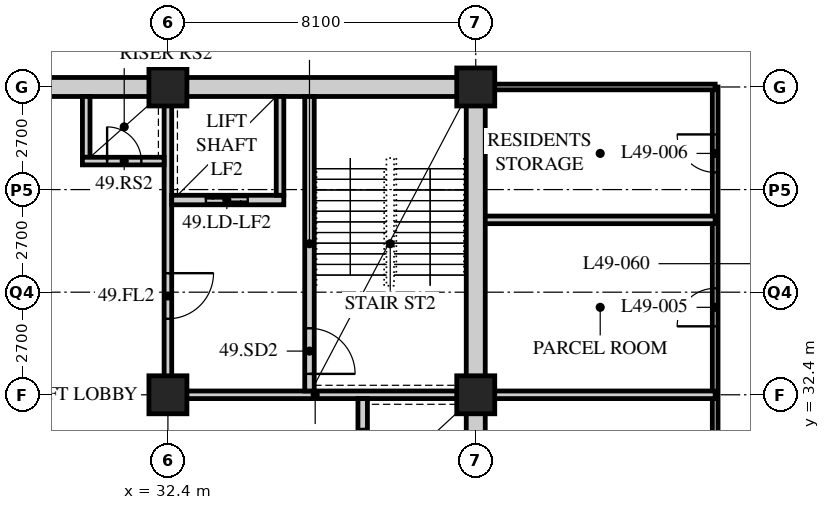
"""IFC4 building model, lengths in metres.
Left out: names, types, materials, properties, quantities, classifications, styles, units other than length and angle.
Written with IfcOpenShell. Run it as: python <this file> out.ifc"""

import sys

from ifc_helpers import new_model, si_unit, direction, frame, frame_2d, origin, origin_2d, place, context, subcontext, project, spatial, rectangle, hollow_rectangle, extrude, element, fill, save


model = new_model("IFC4")
c1 = context("Model", 3, precision=1e-05, world=origin(), true_north=direction((0.0, 1.0)))
c2 = subcontext(c1, "Body", "Model", "MODEL_VIEW")
j1 = project(units=[si_unit("LENGTHUNIT", "METRE"), si_unit("PLANEANGLEUNIT", "RADIAN")], contexts=[c1])
p1 = place(None, origin())
s1 = spatial("IfcSite", under=j1, at=p1, CompositionType="ELEMENT")
p2 = place(p1, origin())
s2 = spatial("IfcBuilding", under=s1, at=p2, CompositionType="ELEMENT")
p3 = place(p2, frame((0.0, 0.0, 192.0)))
s3 = spatial("IfcBuildingStorey", under=s2, at=p3, CompositionType="ELEMENT", Elevation=192.0)
for number, where, z_axis, x_axis in (
    (1, (32.4, 32.4, 0.0), (0.0, 0.0, 1.0), (1.0, 0.0, 0.0)),
    (2, (32.4, 40.5, 0.0), (0.0, 0.0, 1.0), (1.0, 0.0, 0.0)),
    (3, (40.5, 32.4, 0.0), (0.0, 0.0, 1.0), (1.0, 0.0, 0.0)),
    (4, (40.5, 40.5, 0.0), (0.0, 0.0, 1.0), (1.0, 0.0, 0.0)),
):
    element("IfcColumn", number, at=place(p3, frame(where, z_axis=z_axis, x_axis=x_axis)), inside=s3, PredefinedType="COLUMN", context=c2, shape_type="SweptSolid", body=[
        extrude(hollow_rectangle(XDim=1.0, YDim=1.0, WallThickness=0.1, at=origin_2d()), origin(), (0.0, 0.0, 1.0), 3.6),
    ])
p4 = place(p3, frame((46.8, 20.7, 0.0), z_axis=(0.0, 0.0, 1.0), x_axis=(0.0, 1.0, 0.0)))
e5 = element("IfcWall", 5, at=p4, inside=s3, PredefinedType="PARTITIONING", context=c2, shape_type="SweptSolid", body=[
    extrude(rectangle(XDim=19.8, YDim=0.15, at=frame_2d((9.9, 0.0))), origin(), (0.0, 0.0, 1.0), 3.39),
])
p5 = place(p4, frame((4.052, 0.0, 0.0)))
e6 = element("IfcOpeningElement", 6, at=p5, cuts=e5, PredefinedType="OPENING", context=c2, shape_type="SweptSolid", body=[
    extrude(rectangle(XDim=1.0, YDim=2.1, at=frame_2d((0.5, 1.05))), frame((0.0, 0.085, 0.0), z_axis=(0.0, -1.0, 0.0), x_axis=(1.0, 0.0, 0.0)), (0.0, 0.0, 1.0), 0.17),
])
p6 = place(p4, frame((8.102, 0.0, 0.0)))
e7 = element("IfcOpeningElement", 7, at=p6, cuts=e5, PredefinedType="OPENING", context=c2, shape_type="SweptSolid", body=[
    extrude(rectangle(XDim=1.0, YDim=2.1, at=frame_2d((0.5, 1.05))), frame((0.0, 0.085, 0.0), z_axis=(0.0, -1.0, 0.0), x_axis=(1.0, 0.0, 0.0)), (0.0, 0.0, 1.0), 0.17),
])
p7 = place(p4, frame((13.502, 0.0, 0.0)))
e8 = element("IfcOpeningElement", 8, at=p7, cuts=e5, PredefinedType="OPENING", context=c2, shape_type="SweptSolid", body=[
    extrude(rectangle(XDim=1.0, YDim=2.1, at=frame_2d((0.5, 1.05))), frame((0.0, 0.085, 0.0), z_axis=(0.0, -1.0, 0.0), x_axis=(1.0, 0.0, 0.0)), (0.0, 0.0, 1.0), 0.17),
])
p8 = place(p4, frame((17.552, 0.0, 0.0)))
e9 = element("IfcOpeningElement", 9, at=p8, cuts=e5, PredefinedType="OPENING", context=c2, shape_type="SweptSolid", body=[
    extrude(rectangle(XDim=1.0, YDim=2.1, at=frame_2d((0.5, 1.05))), frame((0.0, 0.085, 0.0), z_axis=(0.0, -1.0, 0.0), x_axis=(1.0, 0.0, 0.0)), (0.0, 0.0, 1.0), 0.17),
])
p9 = place(p3, frame((46.8, 40.5, 0.0), z_axis=(0.0, 0.0, 1.0), x_axis=(-1.0, 0.0, 0.0)))
e10 = element("IfcWall", 10, at=p9, inside=s3, PredefinedType="PARTITIONING", context=c2, shape_type="SweptSolid", body=[
    extrude(rectangle(XDim=6.1, YDim=0.15, at=frame_2d((3.05, 0.0))), origin(), (0.0, 0.0, 1.0), 3.39),
])
for number, where, z_axis, x_axis in (
    (11, (40.5, 32.4, 0.0), (0.0, 0.0, 1.0), (1.0, 0.0, 0.0)),
    (12, (46.8, 37.003, 0.0), (0.0, 0.0, 1.0), (-1.0, 0.0, 0.0)),
):
    element("IfcWall", number, at=place(p3, frame(where, z_axis=z_axis, x_axis=x_axis)), inside=s3, PredefinedType="SOLIDWALL", context=c2, shape_type="SweptSolid", body=[
        extrude(rectangle(XDim=6.3, YDim=0.2, at=frame_2d((3.15, 0.0))), origin(), (0.0, 0.0, 1.0), 3.39),
    ])
p10 = place(p3, frame((15.95, 40.5, 0.0), z_axis=(0.0, 0.0, 1.0), x_axis=(1.0, 0.0, 0.0)))
e13 = element("IfcWall", 13, at=p10, inside=s3, PredefinedType="SOLIDWALL", context=c2, shape_type="SweptSolid", body=[
    extrude(rectangle(XDim=24.8, YDim=0.5, at=frame_2d((12.4, 0.0))), origin(), (0.0, 0.0, 1.0), 2.74),
])
p11 = place(p10, frame((11.5, 0.0, 0.0)))
e14 = element("IfcOpeningElement", 14, at=p11, cuts=e13, PredefinedType="OPENING", context=c2, shape_type="SweptSolid", body=[
    extrude(rectangle(XDim=1.8, YDim=2.4, at=frame_2d((0.9, 1.2))), frame((0.0, 0.26, 0.0), z_axis=(0.0, -1.0, 0.0), x_axis=(1.0, 0.0, 0.0)), (0.0, 0.0, 1.0), 0.52),
])
p12 = place(p3, frame((40.5, 24.55, 0.0), z_axis=(0.0, 0.0, 1.0), x_axis=(0.0, 1.0, 0.0)))
e15 = element("IfcWall", 15, at=p12, inside=s3, PredefinedType="SOLIDWALL", context=c2, shape_type="SweptSolid", body=[
    extrude(rectangle(XDim=15.7, YDim=0.5, at=frame_2d((7.85, 0.0))), origin(), (0.0, 0.0, 1.0), 2.778),
])
p13 = place(p3, frame((32.3, 32.4, 0.0), z_axis=(0.0, 0.0, 1.0), x_axis=(1.0, 0.0, 0.0)))
e16 = element("IfcWall", 16, at=p13, inside=s3, PredefinedType="SOLIDWALL", context=c2, shape_type="SweptSolid", body=[
    extrude(rectangle(XDim=7.95, YDim=0.2, at=frame_2d((3.975, 0.0))), origin(), (0.0, 0.0, 1.0), 2.778),
])
p14 = place(p3, frame((32.4, 32.5, 0.0), z_axis=(0.0, 0.0, 1.0), x_axis=(0.0, 1.0, 0.0)))
e17 = element("IfcWall", 17, at=p14, inside=s3, PredefinedType="SOLIDWALL", context=c2, shape_type="SweptSolid", body=[
    extrude(rectangle(XDim=7.75, YDim=0.2, at=frame_2d((3.875, 0.0))), origin(), (0.0, 0.0, 1.0), 2.778),
])
p15 = place(p14, frame((1.9, 0.0, 0.0)))
e18 = element("IfcOpeningElement", 18, at=p15, cuts=e17, PredefinedType="OPENING", context=c2, shape_type="SweptSolid", body=[
    extrude(rectangle(XDim=1.2, YDim=2.1, at=frame_2d((0.6, 1.05))), frame((0.0, 0.11, 0.0), z_axis=(0.0, -1.0, 0.0), x_axis=(1.0, 0.0, 0.0)), (0.0, 0.0, 1.0), 0.22),
])
p16 = place(p3, frame((37.525, 24.55, 0.0), z_axis=(0.0, 0.0, 1.0), x_axis=(0.0, 1.0, 0.0)))
e19 = element("IfcWall", 19, at=p16, inside=s3, PredefinedType="SOLIDWALL", context=c2, shape_type="SweptSolid", body=[
    extrude(rectangle(XDim=7.75, YDim=0.25, at=frame_2d((3.875, 0.0))), origin(), (0.0, 0.0, 1.0), 3.39),
])
p17 = place(p16, frame((0.65, 0.0, 0.0)))
e20 = element("IfcOpeningElement", 20, at=p17, cuts=e19, PredefinedType="OPENING", context=c2, shape_type="SweptSolid", body=[
    extrude(rectangle(XDim=1.1, YDim=2.4, at=frame_2d((0.55, 1.2))), frame((0.0, 0.135, 0.0), z_axis=(0.0, -1.0, 0.0), x_axis=(1.0, 0.0, 0.0)), (0.0, 0.0, 1.0), 0.27),
])
p18 = place(p16, frame((3.25, 0.0, 0.0)))
e21 = element("IfcOpeningElement", 21, at=p18, cuts=e19, PredefinedType="OPENING", context=c2, shape_type="SweptSolid", body=[
    extrude(rectangle(XDim=1.1, YDim=2.4, at=frame_2d((0.55, 1.2))), frame((0.0, 0.135, 0.0), z_axis=(0.0, -1.0, 0.0), x_axis=(1.0, 0.0, 0.0)), (0.0, 0.0, 1.0), 0.27),
])
p19 = place(p16, frame((5.85, 0.0, 0.0)))
e22 = element("IfcOpeningElement", 22, at=p19, cuts=e19, PredefinedType="OPENING", context=c2, shape_type="SweptSolid", body=[
    extrude(rectangle(XDim=1.1, YDim=2.4, at=frame_2d((0.55, 1.2))), frame((0.0, 0.135, 0.0), z_axis=(0.0, -1.0, 0.0), x_axis=(1.0, 0.0, 0.0)), (0.0, 0.0, 1.0), 0.27),
])
p20 = place(p3, frame((36.125, 32.5, 0.0), z_axis=(0.0, 0.0, 1.0), x_axis=(0.0, 1.0, 0.0)))
e23 = element("IfcWall", 23, at=p20, inside=s3, PredefinedType="SOLIDWALL", context=c2, shape_type="SweptSolid", body=[
    extrude(rectangle(XDim=7.75, YDim=0.25, at=frame_2d((3.875, 0.0))), origin(), (0.0, 0.0, 1.0), 3.39),
])
p21 = place(p20, frame((0.45, 0.0, 0.0)))
e24 = element("IfcOpeningElement", 24, at=p21, cuts=e23, PredefinedType="OPENING", context=c2, shape_type="SweptSolid", body=[
    extrude(rectangle(XDim=1.2, YDim=2.1, at=frame_2d((0.6, 1.05))), frame((0.0, 0.135, 0.0), z_axis=(0.0, -1.0, 0.0), x_axis=(1.0, 0.0, 0.0)), (0.0, 0.0, 1.0), 0.27),
])
p22 = place(p3, frame((32.5, 37.525, 0.0), z_axis=(0.0, 0.0, 1.0), x_axis=(1.0, 0.0, 0.0)))
e25 = element("IfcWall", 25, at=p22, inside=s3, PredefinedType="SOLIDWALL", context=c2, shape_type="SweptSolid", body=[
    extrude(rectangle(XDim=2.95, YDim=0.25, at=frame_2d((1.475, 0.0))), origin(), (0.0, 0.0, 1.0), 3.39),
])
p23 = place(p22, frame((0.9, 0.0, 0.0)))
e26 = element("IfcOpeningElement", 26, at=p23, cuts=e25, PredefinedType="OPENING", context=c2, shape_type="SweptSolid", body=[
    extrude(rectangle(XDim=1.1, YDim=2.4, at=frame_2d((0.55, 1.2))), frame((0.0, 0.135, 0.0), z_axis=(0.0, -1.0, 0.0), x_axis=(1.0, 0.0, 0.0)), (0.0, 0.0, 1.0), 0.27),
])
p24 = place(p3, frame((35.35, 37.65, 0.0), z_axis=(0.0, 0.0, 1.0), x_axis=(0.0, 1.0, 0.0)))
e27 = element("IfcWall", 27, at=p24, inside=s3, PredefinedType="SOLIDWALL", context=c2, shape_type="SweptSolid", body=[
    extrude(rectangle(XDim=2.6, YDim=0.2, at=frame_2d((1.3, 0.0))), origin(), (0.0, 0.0, 1.0), 3.39),
])
p25 = place(p3, frame((30.25, 38.65, 0.0), z_axis=(0.0, 0.0, 1.0), x_axis=(0.0, 1.0, 0.0)))
e28 = element("IfcWall", 28, at=p25, inside=s3, PredefinedType="SOLIDWALL", context=c2, shape_type="SweptSolid", body=[
    extrude(rectangle(XDim=1.6, YDim=0.2, at=frame_2d((0.8, 0.0))), origin(), (0.0, 0.0, 1.0), 3.39),
])
p26 = place(p3, frame((30.15, 38.55, 0.0), z_axis=(0.0, 0.0, 1.0), x_axis=(1.0, 0.0, 0.0)))
e29 = element("IfcWall", 29, at=p26, inside=s3, PredefinedType="SOLIDWALL", context=c2, shape_type="SweptSolid", body=[
    extrude(rectangle(XDim=2.15, YDim=0.2, at=frame_2d((1.075, 0.0))), origin(), (0.0, 0.0, 1.0), 3.39),
])
p27 = place(p26, frame((0.65, 0.0, 0.0)))
e30 = element("IfcOpeningElement", 30, at=p27, cuts=e29, PredefinedType="OPENING", context=c2, shape_type="SweptSolid", body=[
    extrude(rectangle(XDim=0.9, YDim=2.1, at=frame_2d((0.45, 1.05))), frame((0.0, 0.11, 0.0), z_axis=(0.0, -1.0, 0.0), x_axis=(1.0, 0.0, 0.0)), (0.0, 0.0, 1.0), 0.22),
])
p28 = place(p7, origin())
e31 = element("IfcDoor", 31, at=p28, inside=s3, OperationType="SINGLE_SWING_LEFT", PredefinedType="DOOR", context=c2, shape_type="SweptSolid", body=[
    extrude(rectangle(XDim=1.0, YDim=2.1, at=frame_2d((0.5, 1.05))), frame((0.0, 0.025, 0.0), z_axis=(0.0, -1.0, 0.0), x_axis=(1.0, 0.0, 0.0)), (0.0, 0.0, 1.0), 0.05),
])
fill(e8, e31)
p29 = place(p8, origin())
e32 = element("IfcDoor", 32, at=p29, inside=s3, OperationType="SINGLE_SWING_RIGHT", PredefinedType="DOOR", context=c2, shape_type="SweptSolid", body=[
    extrude(rectangle(XDim=1.0, YDim=2.1, at=frame_2d((0.5, 1.05))), frame((0.0, 0.025, 0.0), z_axis=(0.0, -1.0, 0.0), x_axis=(1.0, 0.0, 0.0)), (0.0, 0.0, 1.0), 0.05),
])
fill(e9, e32)
p30 = place(p21, origin())
e33 = element("IfcDoor", 33, at=p30, inside=s3, OperationType="SINGLE_SWING_RIGHT", PredefinedType="DOOR", context=c2, shape_type="SweptSolid", body=[
    extrude(rectangle(XDim=1.2, YDim=2.1, at=frame_2d((0.6, 1.05))), frame((0.0, 0.025, 0.0), z_axis=(0.0, -1.0, 0.0), x_axis=(1.0, 0.0, 0.0)), (0.0, 0.0, 1.0), 0.05),
])
fill(e24, e33)
p31 = place(p15, origin())
e34 = element("IfcDoor", 34, at=p31, inside=s3, OperationType="SINGLE_SWING_LEFT", PredefinedType="DOOR", context=c2, shape_type="SweptSolid", body=[
    extrude(rectangle(XDim=1.2, YDim=2.1, at=frame_2d((0.6, 1.05))), frame((0.0, 0.025, 0.0), z_axis=(0.0, -1.0, 0.0), x_axis=(1.0, 0.0, 0.0)), (0.0, 0.0, 1.0), 0.05),
])
fill(e18, e34)
p32 = place(p27, origin())
e35 = element("IfcDoor", 35, at=p32, inside=s3, OperationType="SINGLE_SWING_LEFT", PredefinedType="DOOR", context=c2, shape_type="SweptSolid", body=[
    extrude(rectangle(XDim=0.9, YDim=2.1, at=frame_2d((0.45, 1.05))), frame((0.0, 0.025, 0.0), z_axis=(0.0, -1.0, 0.0), x_axis=(1.0, 0.0, 0.0)), (0.0, 0.0, 1.0), 0.05),
])
fill(e30, e35)
p33 = place(p19, origin())
e36 = element("IfcDoor", 36, at=p33, inside=s3, OperationType="DOUBLE_DOOR_SLIDING", PredefinedType="DOOR", context=c2, shape_type="SweptSolid", body=[
    extrude(rectangle(XDim=1.1, YDim=2.4, at=frame_2d((0.55, 1.2))), frame((0.0, 0.025, 0.0), z_axis=(0.0, -1.0, 0.0), x_axis=(1.0, 0.0, 0.0)), (0.0, 0.0, 1.0), 0.05),
])
fill(e22, e36)
p34 = place(p23, origin())
e37 = element("IfcDoor", 37, at=p34, inside=s3, OperationType="DOUBLE_DOOR_SLIDING", PredefinedType="DOOR", context=c2, shape_type="SweptSolid", body=[
    extrude(rectangle(XDim=1.1, YDim=2.4, at=frame_2d((0.55, 1.2))), frame((0.0, 0.025, 0.0), z_axis=(0.0, -1.0, 0.0), x_axis=(1.0, 0.0, 0.0)), (0.0, 0.0, 1.0), 0.05),
])
fill(e26, e37)
save(model, sys.argv[1])
